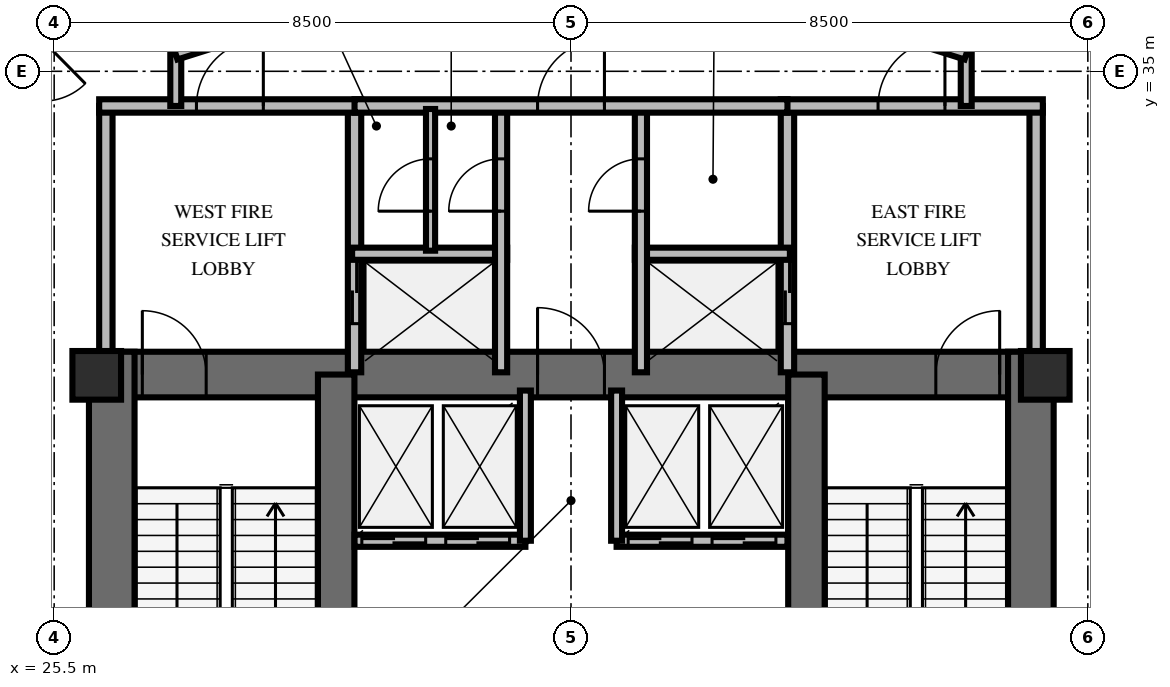
"""IFC4 building model, lengths in metres.
Left out: names, types, materials, properties, quantities, classifications, styles, units other than length and angle.
Written with IfcOpenShell. Run it as: python <this file> out.ifc"""

import sys

from ifc_helpers import new_model, si_unit, direction, frame, frame_2d, origin, origin_2d, place, context, subcontext, project, spatial, rectangle, extrude, element, fill, save


model = new_model("IFC4")
c1 = context("Model", 3, precision=1e-05, world=origin(), true_north=direction((0.0, 1.0)))
c2 = subcontext(c1, "Body", "Model", "MODEL_VIEW")
j1 = project(units=[si_unit("LENGTHUNIT", "METRE"), si_unit("PLANEANGLEUNIT", "RADIAN")], contexts=[c1])
p1 = place(None, origin())
s1 = spatial("IfcSite", under=j1, at=p1, CompositionType="ELEMENT")
p2 = place(p1, origin())
s2 = spatial("IfcBuilding", under=s1, at=p2, CompositionType="ELEMENT")
p3 = place(p2, frame((0.0, 0.0, 216.8)))
s3 = spatial("IfcBuildingStorey", under=s2, at=p3, CompositionType="ELEMENT", Elevation=216.8)
p4 = place(p3, frame((26.072, 30.013, 0.0), z_axis=(0.0, 0.0, 1.0), x_axis=(1.0, 0.0, 0.0)))
e1 = element("IfcWall", 1, at=p4, inside=s3, PredefinedType="SHEAR", context=c2, shape_type="SweptSolid", body=[
    extrude(rectangle(XDim=15.866, YDim=0.75, at=frame_2d((7.933, 0.0))), origin(), (0.0, 0.0, 1.0), 3.6),
])
p5 = place(p4, frame((0.878, 0.0, 0.0)))
e2 = element("IfcOpeningElement", 2, at=p5, cuts=e1, PredefinedType="OPENING", context=c2, shape_type="SweptSolid", body=[
    extrude(rectangle(XDim=1.05, YDim=2.15, at=frame_2d((0.525, 1.075))), frame((0.0, 0.385, 0.0), z_axis=(0.0, -1.0, 0.0), x_axis=(1.0, 0.0, 0.0)), (0.0, 0.0, 1.0), 0.77),
])
p6 = place(p4, frame((13.928, 0.0, 0.0)))
e3 = element("IfcOpeningElement", 3, at=p6, cuts=e1, PredefinedType="OPENING", context=c2, shape_type="SweptSolid", body=[
    extrude(rectangle(XDim=1.05, YDim=2.15, at=frame_2d((0.525, 1.075))), frame((0.0, 0.385, 0.0), z_axis=(0.0, -1.0, 0.0), x_axis=(1.0, 0.0, 0.0)), (0.0, 0.0, 1.0), 0.77),
])
p7 = place(p4, frame((7.378, 0.0, 0.0)))
e4 = element("IfcOpeningElement", 4, at=p7, cuts=e1, PredefinedType="OPENING", context=c2, shape_type="SweptSolid", body=[
    extrude(rectangle(XDim=1.1, YDim=2.15, at=frame_2d((0.55, 1.075))), frame((0.0, 0.385, 0.0), z_axis=(0.0, -1.0, 0.0), x_axis=(1.0, 0.0, 0.0)), (0.0, 0.0, 1.0), 0.77),
])
for number, where, z_axis, x_axis in (
    (5, (26.447, 19.812, 0.0), (0.0, 0.0, 1.0), (0.0, 1.0, 0.0)),
    (6, (41.563, 19.812, 0.0), (0.0, 0.0, 1.0), (0.0, 1.0, 0.0)),
):
    element("IfcWall", number, at=place(p3, frame(where, z_axis=z_axis, x_axis=x_axis)), inside=s3, PredefinedType="SHEAR", context=c2, shape_type="SweptSolid", body=[
        extrude(rectangle(XDim=10.576, YDim=0.75, at=frame_2d((5.288, 0.0))), origin(), (0.0, 0.0, 1.0), 3.6),
    ])
for number, where, z_axis, x_axis in (
    (7, (30.138, 20.187, 0.0), (0.0, 0.0, 1.0), (0.0, 1.0, 0.0)),
    (8, (37.872, 20.187, 0.0), (0.0, 0.0, 1.0), (0.0, 1.0, 0.0)),
):
    element("IfcWall", number, at=place(p3, frame(where, z_axis=z_axis, x_axis=x_axis)), inside=s3, PredefinedType="SHEAR", context=c2, shape_type="SweptSolid", body=[
        extrude(rectangle(XDim=9.826, YDim=0.6, at=frame_2d((4.913, 0.0))), origin(), (0.0, 0.0, 1.0), 3.6),
    ])
for number, where, z_axis, x_axis in (
    (9, (26.2, 30.0, 0.0), (0.0, 0.0, 1.0), (1.0, 0.0, 0.0)),
    (10, (41.8, 30.0, 0.0), (0.0, 0.0, 1.0), (1.0, 0.0, 0.0)),
):
    element("IfcColumn", number, at=place(p3, frame(where, z_axis=z_axis, x_axis=x_axis)), inside=s3, PredefinedType="PILASTER", context=c2, shape_type="SweptSolid", body=[
        extrude(rectangle(XDim=0.8, YDim=0.8, at=origin_2d()), origin(), (0.0, 0.0, 1.0), 3.6),
    ])
p8 = place(p3, frame((26.35, 30.05, 0.0), z_axis=(0.0, 0.0, 1.0), x_axis=(0.0, 1.0, 0.0)))
e11 = element("IfcWall", 11, at=p8, inside=s3, PredefinedType="SOLIDWALL", context=c2, shape_type="SweptSolid", body=[
    extrude(rectangle(XDim=4.38, YDim=0.22, at=frame_2d((2.19, 0.0))), origin(), (0.0, 0.0, 1.0), 2.45),
])
p9 = place(p3, frame((30.44, 30.05, 0.0), z_axis=(0.0, 0.0, 1.0), x_axis=(0.0, 1.0, 0.0)))
e12 = element("IfcWall", 12, at=p9, inside=s3, PredefinedType="SOLIDWALL", context=c2, shape_type="SweptSolid", body=[
    extrude(rectangle(XDim=4.38, YDim=0.22, at=frame_2d((2.19, 0.0))), origin(), (0.0, 0.0, 1.0), 2.45),
])
p10 = place(p9, frame((0.8, 0.0, 0.0)))
e13 = element("IfcOpeningElement", 13, at=p10, cuts=e12, PredefinedType="OPENING", context=c2, shape_type="SweptSolid", body=[
    extrude(rectangle(XDim=1.05, YDim=2.1, at=frame_2d((0.525, 1.05))), frame((0.0, 0.12, 0.0), z_axis=(0.0, -1.0, 0.0), x_axis=(1.0, 0.0, 0.0)), (0.0, 0.0, 1.0), 0.24),
])
p11 = place(p3, frame((26.24, 34.43, 0.0), z_axis=(0.0, 0.0, 1.0), x_axis=(1.0, 0.0, 0.0)))
e14 = element("IfcWall", 14, at=p11, inside=s3, PredefinedType="SOLIDWALL", context=c2, shape_type="SweptSolid", body=[
    extrude(rectangle(XDim=4.31, YDim=0.22, at=frame_2d((2.155, 0.0))), origin(), (0.0, 0.0, 1.0), 2.45),
])
p12 = place(p11, frame((1.6, 0.0, 0.0)))
e15 = element("IfcOpeningElement", 15, at=p12, cuts=e14, PredefinedType="OPENING", context=c2, shape_type="SweptSolid", body=[
    extrude(rectangle(XDim=1.1, YDim=2.15, at=frame_2d((0.55, 1.075))), frame((0.0, 0.12, 0.0), z_axis=(0.0, -1.0, 0.0), x_axis=(1.0, 0.0, 0.0)), (0.0, 0.0, 1.0), 0.24),
])
p13 = place(p3, frame((30.4, 32.0, 0.0), z_axis=(0.0, 0.0, 1.0), x_axis=(1.0, 0.0, 0.0)))
e16 = element("IfcWall", 16, at=p13, inside=s3, PredefinedType="SOLIDWALL", context=c2, shape_type="SweptSolid", body=[
    extrude(rectangle(XDim=2.55, YDim=0.2, at=frame_2d((1.275, 0.0))), origin(), (0.0, 0.0, 1.0), 2.45),
])
p14 = place(p3, frame((32.85, 30.05, 0.0), z_axis=(0.0, 0.0, 1.0), x_axis=(0.0, 1.0, 0.0)))
e17 = element("IfcWall", 17, at=p14, inside=s3, PredefinedType="SOLIDWALL", context=c2, shape_type="SweptSolid", body=[
    extrude(rectangle(XDim=4.38, YDim=0.2, at=frame_2d((2.19, 0.0))), origin(), (0.0, 0.0, 1.0), 2.45),
])
p15 = place(p14, frame((2.65, 0.0, 0.0)))
e18 = element("IfcOpeningElement", 18, at=p15, cuts=e17, PredefinedType="OPENING", context=c2, shape_type="SweptSolid", body=[
    extrude(rectangle(XDim=0.86, YDim=2.05, at=frame_2d((0.43, 1.025))), frame((0.0, 0.11, 0.0), z_axis=(0.0, -1.0, 0.0), x_axis=(1.0, 0.0, 0.0)), (0.0, 0.0, 1.0), 0.22),
])
p16 = place(p3, frame((37.56, 30.05, 0.0), z_axis=(0.0, 0.0, 1.0), x_axis=(0.0, 1.0, 0.0)))
e19 = element("IfcWall", 19, at=p16, inside=s3, PredefinedType="SOLIDWALL", context=c2, shape_type="SweptSolid", body=[
    extrude(rectangle(XDim=4.38, YDim=0.22, at=frame_2d((2.19, 0.0))), origin(), (0.0, 0.0, 1.0), 2.45),
])
p17 = place(p16, frame((0.8, 0.0, 0.0)))
e20 = element("IfcOpeningElement", 20, at=p17, cuts=e19, PredefinedType="OPENING", context=c2, shape_type="SweptSolid", body=[
    extrude(rectangle(XDim=1.05, YDim=2.1, at=frame_2d((0.525, 1.05))), frame((0.0, 0.12, 0.0), z_axis=(0.0, -1.0, 0.0), x_axis=(1.0, 0.0, 0.0)), (0.0, 0.0, 1.0), 0.24),
])
p18 = place(p3, frame((41.65, 30.05, 0.0), z_axis=(0.0, 0.0, 1.0), x_axis=(0.0, 1.0, 0.0)))
e21 = element("IfcWall", 21, at=p18, inside=s3, PredefinedType="SOLIDWALL", context=c2, shape_type="SweptSolid", body=[
    extrude(rectangle(XDim=4.38, YDim=0.22, at=frame_2d((2.19, 0.0))), origin(), (0.0, 0.0, 1.0), 2.45),
])
p19 = place(p3, frame((37.45, 34.43, 0.0), z_axis=(0.0, 0.0, 1.0), x_axis=(1.0, 0.0, 0.0)))
e22 = element("IfcWall", 22, at=p19, inside=s3, PredefinedType="SOLIDWALL", context=c2, shape_type="SweptSolid", body=[
    extrude(rectangle(XDim=4.31, YDim=0.22, at=frame_2d((2.155, 0.0))), origin(), (0.0, 0.0, 1.0), 2.45),
])
p20 = place(p19, frame((1.6, 0.0, 0.0)))
e23 = element("IfcOpeningElement", 23, at=p20, cuts=e22, PredefinedType="OPENING", context=c2, shape_type="SweptSolid", body=[
    extrude(rectangle(XDim=1.1, YDim=2.15, at=frame_2d((0.55, 1.075))), frame((0.0, 0.12, 0.0), z_axis=(0.0, -1.0, 0.0), x_axis=(1.0, 0.0, 0.0)), (0.0, 0.0, 1.0), 0.24),
])
p21 = place(p3, frame((35.05, 32.0, 0.0), z_axis=(0.0, 0.0, 1.0), x_axis=(1.0, 0.0, 0.0)))
e24 = element("IfcWall", 24, at=p21, inside=s3, PredefinedType="SOLIDWALL", context=c2, shape_type="SweptSolid", body=[
    extrude(rectangle(XDim=2.55, YDim=0.2, at=frame_2d((1.275, 0.0))), origin(), (0.0, 0.0, 1.0), 2.45),
])
p22 = place(p3, frame((35.15, 30.05, 0.0), z_axis=(0.0, 0.0, 1.0), x_axis=(0.0, 1.0, 0.0)))
e25 = element("IfcWall", 25, at=p22, inside=s3, PredefinedType="SOLIDWALL", context=c2, shape_type="SweptSolid", body=[
    extrude(rectangle(XDim=4.38, YDim=0.2, at=frame_2d((2.19, 0.0))), origin(), (0.0, 0.0, 1.0), 2.45),
])
p23 = place(p22, frame((2.65, 0.0, 0.0)))
e26 = element("IfcOpeningElement", 26, at=p23, cuts=e25, PredefinedType="OPENING", context=c2, shape_type="SweptSolid", body=[
    extrude(rectangle(XDim=0.86, YDim=2.05, at=frame_2d((0.43, 1.025))), frame((0.0, 0.11, 0.0), z_axis=(0.0, -1.0, 0.0), x_axis=(1.0, 0.0, 0.0)), (0.0, 0.0, 1.0), 0.22),
])
p24 = place(p3, frame((30.44, 34.43, 0.0), z_axis=(0.0, 0.0, 1.0), x_axis=(1.0, 0.0, 0.0)))
e27 = element("IfcWall", 27, at=p24, inside=s3, PredefinedType="SOLIDWALL", context=c2, shape_type="SweptSolid", body=[
    extrude(rectangle(XDim=7.12, YDim=0.22, at=frame_2d((3.56, 0.0))), origin(), (0.0, 0.0, 1.0), 2.45),
])
p25 = place(p24, frame((3.01, 0.0, 0.0)))
e28 = element("IfcOpeningElement", 28, at=p25, cuts=e27, PredefinedType="OPENING", context=c2, shape_type="SweptSolid", body=[
    extrude(rectangle(XDim=1.1, YDim=2.15, at=frame_2d((0.55, 1.075))), frame((0.0, 0.12, 0.0), z_axis=(0.0, -1.0, 0.0), x_axis=(1.0, 0.0, 0.0)), (0.0, 0.0, 1.0), 0.24),
])
p26 = place(p3, frame((31.69, 32.05, 0.0), z_axis=(0.0, 0.0, 1.0), x_axis=(0.0, 1.0, 0.0)))
e29 = element("IfcWall", 29, at=p26, inside=s3, PredefinedType="PARTITIONING", context=c2, shape_type="SweptSolid", body=[
    extrude(rectangle(XDim=2.33, YDim=0.15, at=frame_2d((1.165, 0.0))), origin(), (0.0, 0.0, 1.0), 2.45),
])
p27 = place(p26, frame((0.65, 0.0, 0.0)))
e30 = element("IfcOpeningElement", 30, at=p27, cuts=e29, PredefinedType="OPENING", context=c2, shape_type="SweptSolid", body=[
    extrude(rectangle(XDim=0.86, YDim=2.05, at=frame_2d((0.43, 1.025))), frame((0.0, 0.085, 0.0), z_axis=(0.0, -1.0, 0.0), x_axis=(1.0, 0.0, 0.0)), (0.0, 0.0, 1.0), 0.17),
])
p28 = place(p3, frame((30.44, 27.28, 0.0), z_axis=(0.0, 0.0, 1.0), x_axis=(1.0, 0.0, 0.0)))
e31 = element("IfcWall", 31, at=p28, inside=s3, PredefinedType="SOLIDWALL", context=c2, shape_type="SweptSolid", body=[
    extrude(rectangle(XDim=2.81, YDim=0.2, at=frame_2d((1.405, 0.0))), origin(), (0.0, 0.0, 1.0), 2.45),
])
p29 = place(p28, frame((0.12, 0.0, 0.0)))
e32 = element("IfcOpeningElement", 32, at=p29, cuts=e31, PredefinedType="OPENING", context=c2, shape_type="SweptSolid", body=[
    extrude(rectangle(XDim=1.05, YDim=2.1, at=frame_2d((0.525, 1.05))), frame((0.0, 0.11, 0.0), z_axis=(0.0, -1.0, 0.0), x_axis=(1.0, 0.0, 0.0)), (0.0, 0.0, 1.0), 0.22),
])
p30 = place(p28, frame((1.5, 0.0, 0.0)))
e33 = element("IfcOpeningElement", 33, at=p30, cuts=e31, PredefinedType="OPENING", context=c2, shape_type="SweptSolid", body=[
    extrude(rectangle(XDim=1.05, YDim=2.1, at=frame_2d((0.525, 1.05))), frame((0.0, 0.11, 0.0), z_axis=(0.0, -1.0, 0.0), x_axis=(1.0, 0.0, 0.0)), (0.0, 0.0, 1.0), 0.22),
])
p31 = place(p3, frame((33.25, 27.28, 0.0), z_axis=(0.0, 0.0, 1.0), x_axis=(0.0, 1.0, 0.0)))
e34 = element("IfcWall", 34, at=p31, inside=s3, PredefinedType="SOLIDWALL", context=c2, shape_type="SweptSolid", body=[
    extrude(rectangle(XDim=2.47, YDim=0.18, at=frame_2d((1.235, 0.0))), origin(), (0.0, 0.0, 1.0), 2.45),
])
p32 = place(p3, frame((34.75, 27.28, 0.0), z_axis=(0.0, 0.0, 1.0), x_axis=(1.0, 0.0, 0.0)))
e35 = element("IfcWall", 35, at=p32, inside=s3, PredefinedType="SOLIDWALL", context=c2, shape_type="SweptSolid", body=[
    extrude(rectangle(XDim=2.81, YDim=0.2, at=frame_2d((1.405, 0.0))), origin(), (0.0, 0.0, 1.0), 2.45),
])
p33 = place(p32, frame((0.19, 0.0, 0.0)))
e36 = element("IfcOpeningElement", 36, at=p33, cuts=e35, PredefinedType="OPENING", context=c2, shape_type="SweptSolid", body=[
    extrude(rectangle(XDim=1.05, YDim=2.1, at=frame_2d((0.525, 1.05))), frame((0.0, 0.11, 0.0), z_axis=(0.0, -1.0, 0.0), x_axis=(1.0, 0.0, 0.0)), (0.0, 0.0, 1.0), 0.22),
])
p34 = place(p32, frame((1.57, 0.0, 0.0)))
e37 = element("IfcOpeningElement", 37, at=p34, cuts=e35, PredefinedType="OPENING", context=c2, shape_type="SweptSolid", body=[
    extrude(rectangle(XDim=1.05, YDim=2.1, at=frame_2d((0.525, 1.05))), frame((0.0, 0.11, 0.0), z_axis=(0.0, -1.0, 0.0), x_axis=(1.0, 0.0, 0.0)), (0.0, 0.0, 1.0), 0.22),
])
p35 = place(p3, frame((34.75, 27.28, 0.0), z_axis=(0.0, 0.0, 1.0), x_axis=(0.0, 1.0, 0.0)))
e38 = element("IfcWall", 38, at=p35, inside=s3, PredefinedType="SOLIDWALL", context=c2, shape_type="SweptSolid", body=[
    extrude(rectangle(XDim=2.47, YDim=0.18, at=frame_2d((1.235, 0.0))), origin(), (0.0, 0.0, 1.0), 2.45),
])
for number, where, z_axis, x_axis in (
    (39, (27.5, 34.43, 0.0), (0.0, 0.0, 1.0), (0.0, 1.0, 0.0)),
    (40, (40.5, 35.28, 0.0), (0.0, 0.0, 1.0), (0.0, -1.0, 0.0)),
):
    element("IfcWall", number, at=place(p3, frame(where, z_axis=z_axis, x_axis=x_axis)), inside=s3, PredefinedType="PARTITIONING", context=c2, shape_type="SweptSolid", body=[
        extrude(rectangle(XDim=0.85, YDim=0.18, at=frame_2d((0.425, 0.0))), origin(), (0.0, 0.0, 1.0), 2.45),
    ])
p36 = place(p3, frame((27.5, 35.28, 0.0), z_axis=(0.0, 0.0, 1.0), x_axis=(0.953691418528, 0.300786765376, 0.0)))
e41 = element("IfcWall", 41, at=p36, inside=s3, PredefinedType="PARTITIONING", context=c2, shape_type="SweptSolid", body=[
    extrude(rectangle(XDim=6.816, YDim=0.18, at=frame_2d((3.408, 0.0))), origin(), (0.0, 0.0, 1.0), 2.45),
])
p37 = place(p36, frame((2.858, 0.0, 0.0)))
e42 = element("IfcOpeningElement", 42, at=p37, cuts=e41, PredefinedType="OPENING", context=c2, shape_type="SweptSolid", body=[
    extrude(rectangle(XDim=1.1, YDim=2.15, at=frame_2d((0.55, 1.075))), frame((0.0, 0.1, 0.0), z_axis=(0.0, -1.0, 0.0), x_axis=(1.0, 0.0, 0.0)), (0.0, 0.0, 1.0), 0.2),
])
p38 = place(p3, frame((34.0, 37.33, 0.0), z_axis=(0.0, 0.0, 1.0), x_axis=(0.953691418528, -0.300786765376, 0.0)))
e43 = element("IfcWall", 43, at=p38, inside=s3, PredefinedType="PARTITIONING", context=c2, shape_type="SweptSolid", body=[
    extrude(rectangle(XDim=6.816, YDim=0.18, at=frame_2d((3.408, 0.0))), origin(), (0.0, 0.0, 1.0), 2.45),
])
p39 = place(p38, frame((2.858, 0.0, 0.0)))
e44 = element("IfcOpeningElement", 44, at=p39, cuts=e43, PredefinedType="OPENING", context=c2, shape_type="SweptSolid", body=[
    extrude(rectangle(XDim=1.1, YDim=2.15, at=frame_2d((0.55, 1.075))), frame((0.0, 0.1, 0.0), z_axis=(0.0, -1.0, 0.0), x_axis=(1.0, 0.0, 0.0)), (0.0, 0.0, 1.0), 0.2),
])
p40 = place(p3, frame((43.298, 35.185, 0.0), z_axis=(0.0, 0.0, 1.0), x_axis=(-0.815622593255, 0.578584294094, 0.0)))
e45 = element("IfcWall", 45, at=p40, inside=s3, PredefinedType="PARTITIONING", context=c2, shape_type="SweptSolid", body=[
    extrude(rectangle(XDim=4.539, YDim=0.18, at=frame_2d((2.27, 0.0))), origin(), (0.0, 0.0, 1.0), 2.45),
])
p41 = place(p3, frame((26.569, 36.752, 0.0), z_axis=(0.0, 0.0, 1.0), x_axis=(-0.711423272881, -0.702763777384, 0.0)))
e46 = element("IfcWall", 46, at=p41, inside=s3, PredefinedType="PARTITIONING", context=c2, shape_type="SweptSolid", body=[
    extrude(rectangle(XDim=4.539, YDim=0.18, at=frame_2d((2.27, 0.0))), origin(), (0.0, 0.0, 1.0), 2.45),
])
p42 = place(p41, frame((1.77, 0.0, 0.0)))
e47 = element("IfcOpeningElement", 47, at=p42, cuts=e46, PredefinedType="OPENING", context=c2, shape_type="SweptSolid", body=[
    extrude(rectangle(XDim=1.0, YDim=2.15, at=frame_2d((0.5, 1.075))), frame((0.0, 0.1, 0.0), z_axis=(0.0, -1.0, 0.0), x_axis=(1.0, 0.0, 0.0)), (0.0, 0.0, 1.0), 0.2),
])
p43 = place(p5, origin())
e48 = element("IfcDoor", 48, at=p43, inside=s3, OperationType="SINGLE_SWING_LEFT", PredefinedType="DOOR", context=c2, shape_type="SweptSolid", body=[
    extrude(rectangle(XDim=1.05, YDim=2.15, at=frame_2d((0.525, 1.075))), frame((0.0, 0.025, 0.0), z_axis=(0.0, -1.0, 0.0), x_axis=(1.0, 0.0, 0.0)), (0.0, 0.0, 1.0), 0.05),
])
fill(e2, e48)
p44 = place(p6, origin())
e49 = element("IfcDoor", 49, at=p44, inside=s3, OperationType="SINGLE_SWING_RIGHT", PredefinedType="DOOR", context=c2, shape_type="SweptSolid", body=[
    extrude(rectangle(XDim=1.05, YDim=2.15, at=frame_2d((0.525, 1.075))), frame((0.0, 0.025, 0.0), z_axis=(0.0, -1.0, 0.0), x_axis=(1.0, 0.0, 0.0)), (0.0, 0.0, 1.0), 0.05),
])
fill(e3, e49)
p45 = place(p7, origin())
e50 = element("IfcDoor", 50, at=p45, inside=s3, OperationType="SINGLE_SWING_LEFT", PredefinedType="DOOR", context=c2, shape_type="SweptSolid", body=[
    extrude(rectangle(XDim=1.1, YDim=2.15, at=frame_2d((0.55, 1.075))), frame((0.0, 0.025, 0.0), z_axis=(0.0, -1.0, 0.0), x_axis=(1.0, 0.0, 0.0)), (0.0, 0.0, 1.0), 0.05),
])
fill(e4, e50)
p46 = place(p12, origin())
e51 = element("IfcDoor", 51, at=p46, inside=s3, OperationType="SINGLE_SWING_RIGHT", PredefinedType="DOOR", context=c2, shape_type="SweptSolid", body=[
    extrude(rectangle(XDim=1.1, YDim=2.15, at=frame_2d((0.55, 1.075))), frame((0.0, 0.025, 0.0), z_axis=(0.0, -1.0, 0.0), x_axis=(1.0, 0.0, 0.0)), (0.0, 0.0, 1.0), 0.05),
])
fill(e15, e51)
p47 = place(p10, origin())
e52 = element("IfcDoor", 52, at=p47, inside=s3, OperationType="DOUBLE_DOOR_SLIDING", PredefinedType="USERDEFINED", context=c2, shape_type="SweptSolid", body=[
    extrude(rectangle(XDim=1.05, YDim=2.1, at=frame_2d((0.525, 1.05))), frame((0.0, 0.025, 0.0), z_axis=(0.0, -1.0, 0.0), x_axis=(1.0, 0.0, 0.0)), (0.0, 0.0, 1.0), 0.05),
])
fill(e13, e52)
p48 = place(p15, origin())
e53 = element("IfcDoor", 53, at=p48, inside=s3, OperationType="SINGLE_SWING_LEFT", PredefinedType="TRAPDOOR", context=c2, shape_type="SweptSolid", body=[
    extrude(rectangle(XDim=0.86, YDim=2.05, at=frame_2d((0.43, 1.025))), frame((0.0, 0.025, 0.0), z_axis=(0.0, -1.0, 0.0), x_axis=(1.0, 0.0, 0.0)), (0.0, 0.0, 1.0), 0.05),
])
fill(e18, e53)
p49 = place(p20, origin())
e54 = element("IfcDoor", 54, at=p49, inside=s3, OperationType="SINGLE_SWING_RIGHT", PredefinedType="DOOR", context=c2, shape_type="SweptSolid", body=[
    extrude(rectangle(XDim=1.1, YDim=2.15, at=frame_2d((0.55, 1.075))), frame((0.0, 0.025, 0.0), z_axis=(0.0, -1.0, 0.0), x_axis=(1.0, 0.0, 0.0)), (0.0, 0.0, 1.0), 0.05),
])
fill(e23, e54)
p50 = place(p17, origin())
e55 = element("IfcDoor", 55, at=p50, inside=s3, OperationType="DOUBLE_DOOR_SLIDING", PredefinedType="USERDEFINED", context=c2, shape_type="SweptSolid", body=[
    extrude(rectangle(XDim=1.05, YDim=2.1, at=frame_2d((0.525, 1.05))), frame((0.0, 0.025, 0.0), z_axis=(0.0, -1.0, 0.0), x_axis=(1.0, 0.0, 0.0)), (0.0, 0.0, 1.0), 0.05),
])
fill(e20, e55)
p51 = place(p23, origin())
e56 = element("IfcDoor", 56, at=p51, inside=s3, OperationType="SINGLE_SWING_LEFT", PredefinedType="TRAPDOOR", context=c2, shape_type="SweptSolid", body=[
    extrude(rectangle(XDim=0.86, YDim=2.05, at=frame_2d((0.43, 1.025))), frame((0.0, 0.025, 0.0), z_axis=(0.0, -1.0, 0.0), x_axis=(1.0, 0.0, 0.0)), (0.0, 0.0, 1.0), 0.05),
])
fill(e26, e56)
p52 = place(p25, origin())
e57 = element("IfcDoor", 57, at=p52, inside=s3, OperationType="SINGLE_SWING_RIGHT", PredefinedType="DOOR", context=c2, shape_type="SweptSolid", body=[
    extrude(rectangle(XDim=1.1, YDim=2.15, at=frame_2d((0.55, 1.075))), frame((0.0, 0.025, 0.0), z_axis=(0.0, -1.0, 0.0), x_axis=(1.0, 0.0, 0.0)), (0.0, 0.0, 1.0), 0.05),
])
fill(e28, e57)
p53 = place(p27, origin())
e58 = element("IfcDoor", 58, at=p53, inside=s3, OperationType="SINGLE_SWING_LEFT", PredefinedType="TRAPDOOR", context=c2, shape_type="SweptSolid", body=[
    extrude(rectangle(XDim=0.86, YDim=2.05, at=frame_2d((0.43, 1.025))), frame((0.0, 0.025, 0.0), z_axis=(0.0, -1.0, 0.0), x_axis=(1.0, 0.0, 0.0)), (0.0, 0.0, 1.0), 0.05),
])
fill(e30, e58)
p54 = place(p29, origin())
e59 = element("IfcDoor", 59, at=p54, inside=s3, OperationType="DOUBLE_DOOR_SLIDING", PredefinedType="USERDEFINED", context=c2, shape_type="SweptSolid", body=[
    extrude(rectangle(XDim=1.05, YDim=2.1, at=frame_2d((0.525, 1.05))), frame((0.0, 0.025, 0.0), z_axis=(0.0, -1.0, 0.0), x_axis=(1.0, 0.0, 0.0)), (0.0, 0.0, 1.0), 0.05),
])
fill(e32, e59)
p55 = place(p30, origin())
e60 = element("IfcDoor", 60, at=p55, inside=s3, OperationType="DOUBLE_DOOR_SLIDING", PredefinedType="USERDEFINED", context=c2, shape_type="SweptSolid", body=[
    extrude(rectangle(XDim=1.05, YDim=2.1, at=frame_2d((0.525, 1.05))), frame((0.0, 0.025, 0.0), z_axis=(0.0, -1.0, 0.0), x_axis=(1.0, 0.0, 0.0)), (0.0, 0.0, 1.0), 0.05),
])
fill(e33, e60)
p56 = place(p33, origin())
e61 = element("IfcDoor", 61, at=p56, inside=s3, OperationType="DOUBLE_DOOR_SLIDING", PredefinedType="USERDEFINED", context=c2, shape_type="SweptSolid", body=[
    extrude(rectangle(XDim=1.05, YDim=2.1, at=frame_2d((0.525, 1.05))), frame((0.0, 0.025, 0.0), z_axis=(0.0, -1.0, 0.0), x_axis=(1.0, 0.0, 0.0)), (0.0, 0.0, 1.0), 0.05),
])
fill(e36, e61)
p57 = place(p34, origin())
e62 = element("IfcDoor", 62, at=p57, inside=s3, OperationType="DOUBLE_DOOR_SLIDING", PredefinedType="USERDEFINED", context=c2, shape_type="SweptSolid", body=[
    extrude(rectangle(XDim=1.05, YDim=2.1, at=frame_2d((0.525, 1.05))), frame((0.0, 0.025, 0.0), z_axis=(0.0, -1.0, 0.0), x_axis=(1.0, 0.0, 0.0)), (0.0, 0.0, 1.0), 0.05),
])
fill(e37, e62)
save(model, sys.argv[1])
